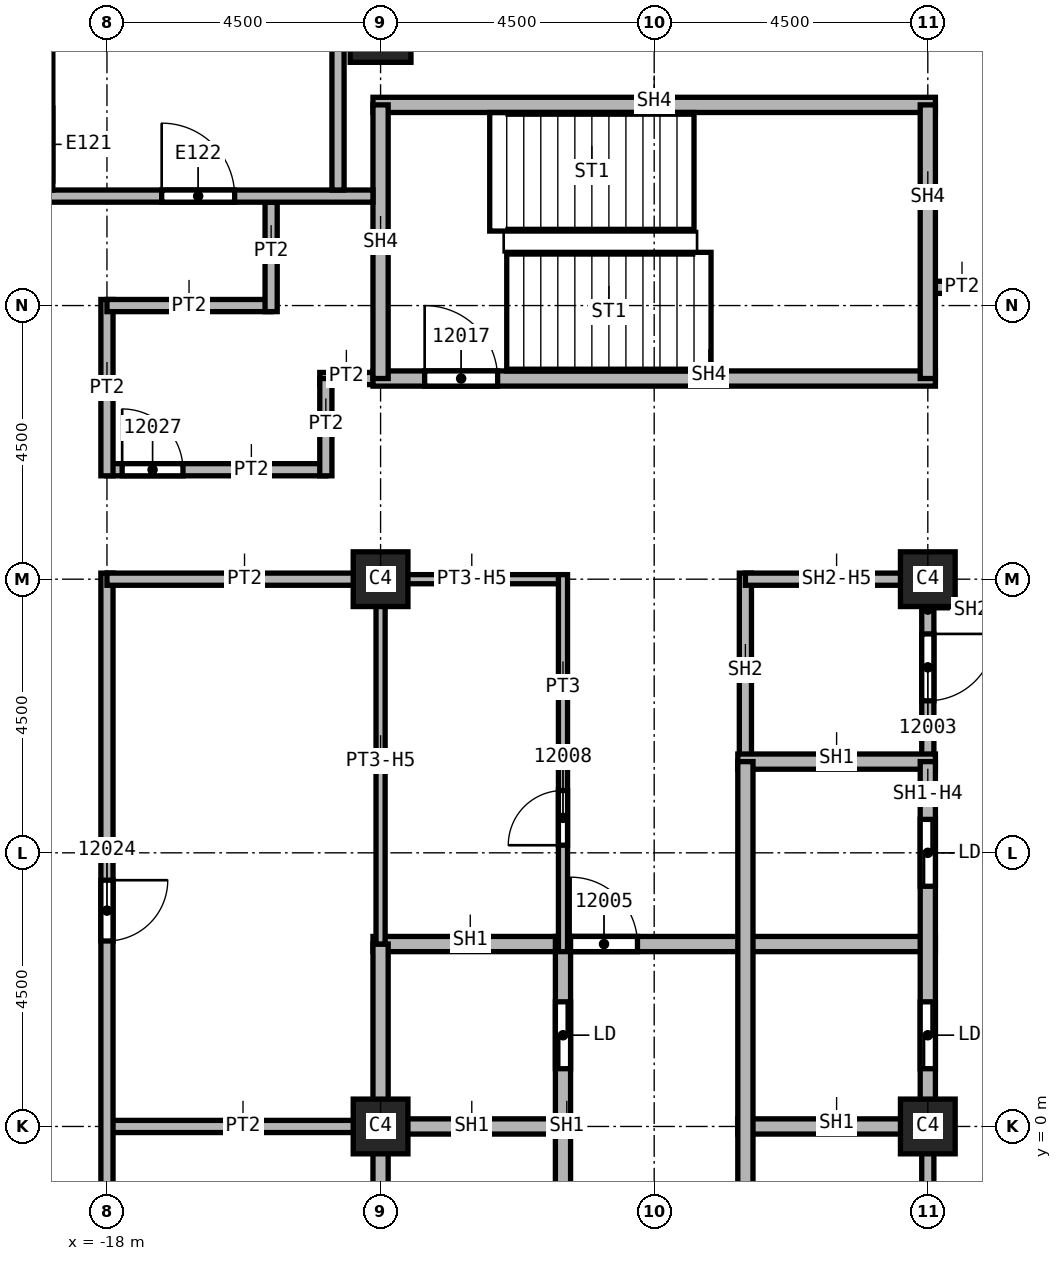
"""IFC4 building model, lengths in metres.
Left out: names, types, materials, properties, quantities, classifications, styles, units other than length and angle.
Written with IfcOpenShell. Run it as: python <this file> out.ifc"""

import sys

from ifc_helpers import new_model, si_unit, direction, frame, frame_2d, origin, origin_2d, place, context, subcontext, project, spatial, rectangle, extrude, element, fill, save


model = new_model("IFC4")
c1 = context("Model", 3, precision=1e-05, world=origin(), true_north=direction((0.0, 1.0)))
c2 = subcontext(c1, "Body", "Model", "MODEL_VIEW")
j1 = project(units=[si_unit("LENGTHUNIT", "METRE"), si_unit("PLANEANGLEUNIT", "RADIAN")], contexts=[c1])
p1 = place(None, origin())
s1 = spatial("IfcSite", under=j1, at=p1, CompositionType="ELEMENT")
p2 = place(p1, origin())
s2 = spatial("IfcBuilding", under=s1, at=p2, CompositionType="ELEMENT")
p3 = place(p2, frame((0.0, 0.0, 196.0)))
s3 = spatial("IfcBuildingStorey", under=s2, at=p3, CompositionType="ELEMENT", Elevation=196.0)
p4 = place(p3, frame((-13.5, 18.0, 0.0), z_axis=(0.0, 0.0, 1.0), x_axis=(1.0, 0.0, 0.0)))
e1 = element("IfcColumn", 1, at=p4, inside=s3, PredefinedType="COLUMN", context=c2, shape_type="SweptSolid", body=[
    extrude(rectangle(XDim=1.0, YDim=1.0, at=origin_2d()), origin(), (0.0, 0.0, 1.0), 3.72),
])
for number, where, z_axis, x_axis in (
    (2, (-4.5, 0.0, 0.0), (0.0, 0.0, 1.0), (1.0, 0.0, 0.0)),
    (3, (-4.5, 9.0, 0.0), (0.0, 0.0, 1.0), (1.0, 0.0, 0.0)),
    (4, (-13.5, 0.0, 0.0), (0.0, 0.0, 1.0), (1.0, 0.0, 0.0)),
    (5, (-13.5, 9.0, 0.0), (0.0, 0.0, 1.0), (1.0, 0.0, 0.0)),
):
    element("IfcColumn", number, at=place(p3, frame(where, z_axis=z_axis, x_axis=x_axis)), inside=s3, PredefinedType="COLUMN", context=c2, shape_type="SweptSolid", body=[
        extrude(rectangle(XDim=0.9, YDim=0.9, at=origin_2d()), origin(), (0.0, 0.0, 1.0), 3.72),
    ])
p5 = place(p3, frame((-18.0, 0.0, 0.0), z_axis=(0.0, 0.0, 1.0), x_axis=(1.0, 0.0, 0.0)))
e6 = element("IfcWall", 6, at=p5, inside=s3, PredefinedType="PARTITIONING", context=c2, shape_type="SweptSolid", body=[
    extrude(rectangle(XDim=4.5, YDim=0.2, at=frame_2d((2.25, 0.0))), origin(), (0.0, 0.0, 1.0), 3.72),
])
p6 = place(p3, frame((-18.0, 9.1, 0.0), z_axis=(0.0, 0.0, 1.0), x_axis=(0.0, -1.0, 0.0)))
e7 = element("IfcWall", 7, at=p6, inside=s3, PredefinedType="PARTITIONING", context=c2, shape_type="SweptSolid", body=[
    extrude(rectangle(XDim=18.2, YDim=0.2, at=frame_2d((9.1, 0.0))), origin(), (0.0, 0.0, 1.0), 3.72),
])
p7 = place(p6, frame((14.95, 0.0, 0.0)))
e8 = element("IfcOpeningElement", 8, at=p7, cuts=e7, PredefinedType="OPENING", context=c2, shape_type="SweptSolid", body=[
    extrude(rectangle(XDim=1.0, YDim=2.1, at=frame_2d((0.5, 1.05))), frame((0.0, 0.1, 0.0), z_axis=(0.0, -1.0, 0.0), x_axis=(1.0, 0.0, 0.0)), (0.0, 0.0, 1.0), 0.2),
])
p8 = place(p6, frame((5.05, 0.0, 0.0)))
e9 = element("IfcOpeningElement", 9, at=p8, cuts=e7, PredefinedType="OPENING", context=c2, shape_type="SweptSolid", body=[
    extrude(rectangle(XDim=1.0, YDim=2.1, at=frame_2d((0.5, 1.05))), frame((0.0, 0.1, 0.0), z_axis=(0.0, -1.0, 0.0), x_axis=(1.0, 0.0, 0.0)), (0.0, 0.0, 1.0), 0.2),
])
p9 = place(p3, frame((-18.0, 10.8, 0.0), z_axis=(0.0, 0.0, 1.0), x_axis=(1.0, 0.0, 0.0)))
e10 = element("IfcWall", 10, at=p9, inside=s3, PredefinedType="PARTITIONING", context=c2, shape_type="SweptSolid", body=[
    extrude(rectangle(XDim=3.6, YDim=0.2, at=frame_2d((1.8, 0.0))), origin(), (0.0, 0.0, 1.0), 3.72),
])
p10 = place(p9, frame((0.25, 0.0, 0.0)))
e11 = element("IfcOpeningElement", 11, at=p10, cuts=e10, PredefinedType="OPENING", context=c2, shape_type="SweptSolid", body=[
    extrude(rectangle(XDim=1.0, YDim=2.1, at=frame_2d((0.5, 1.05))), frame((0.0, 0.1, 0.0), z_axis=(0.0, -1.0, 0.0), x_axis=(1.0, 0.0, 0.0)), (0.0, 0.0, 1.0), 0.2),
])
p11 = place(p3, frame((-18.0, 13.6, 0.0), z_axis=(0.0, 0.0, 1.0), x_axis=(0.0, -1.0, 0.0)))
e12 = element("IfcWall", 12, at=p11, inside=s3, PredefinedType="PARTITIONING", context=c2, shape_type="SweptSolid", body=[
    extrude(rectangle(XDim=2.9, YDim=0.2, at=frame_2d((1.45, 0.0))), origin(), (0.0, 0.0, 1.0), 3.72),
])
p12 = place(p3, frame((-15.3, 13.5, 0.0), z_axis=(0.0, 0.0, 1.0), x_axis=(-1.0, 0.0, 0.0)))
e13 = element("IfcWall", 13, at=p12, inside=s3, PredefinedType="PARTITIONING", context=c2, shape_type="SweptSolid", body=[
    extrude(rectangle(XDim=2.7, YDim=0.2, at=frame_2d((1.35, 0.0))), origin(), (0.0, 0.0, 1.0), 3.72),
])
p13 = place(p3, frame((-15.3, 15.2, 0.0), z_axis=(0.0, 0.0, 1.0), x_axis=(0.0, -1.0, 0.0)))
e14 = element("IfcWall", 14, at=p13, inside=s3, PredefinedType="PARTITIONING", context=c2, shape_type="SweptSolid", body=[
    extrude(rectangle(XDim=1.8, YDim=0.2, at=frame_2d((0.9, 0.0))), origin(), (0.0, 0.0, 1.0), 3.72),
])
p14 = place(p3, frame((-14.5, 12.3, 0.0), z_axis=(0.0, 0.0, 1.0), x_axis=(1.0, 0.0, 0.0)))
e15 = element("IfcWall", 15, at=p14, inside=s3, PredefinedType="PARTITIONING", context=c2, shape_type="SweptSolid", body=[
    extrude(rectangle(XDim=1.125, YDim=0.2, at=frame_2d((0.562, 0.0))), origin(), (0.0, 0.0, 1.0), 3.72),
])
p15 = place(p3, frame((-13.5, 9.0, 0.0), z_axis=(0.0, 0.0, 1.0), x_axis=(-1.0, 0.0, 0.0)))
e16 = element("IfcWall", 16, at=p15, inside=s3, PredefinedType="PARTITIONING", context=c2, shape_type="SweptSolid", body=[
    extrude(rectangle(XDim=4.5, YDim=0.2, at=frame_2d((2.25, 0.0))), origin(), (0.0, 0.0, 1.0), 3.72),
])
p16 = place(p3, frame((-14.4, 10.7, 0.0), z_axis=(0.0, 0.0, 1.0), x_axis=(0.0, 1.0, 0.0)))
e17 = element("IfcWall", 17, at=p16, inside=s3, PredefinedType="PARTITIONING", context=c2, shape_type="SweptSolid", body=[
    extrude(rectangle(XDim=1.6, YDim=0.2, at=frame_2d((0.8, 0.0))), origin(), (0.0, 0.0, 1.0), 3.72),
])
p17 = place(p3, frame((-4.5, 13.8, 0.0), z_axis=(0.0, 0.0, 1.0), x_axis=(1.0, 0.0, 0.0)))
e18 = element("IfcWall", 18, at=p17, inside=s3, PredefinedType="PARTITIONING", context=c2, shape_type="SweptSolid", body=[
    extrude(rectangle(XDim=1.0, YDim=0.2, at=frame_2d((0.5, 0.0))), origin(), (0.0, 0.0, 1.0), 3.72),
])
p18 = place(p3, frame((-7.5, 6.0, 0.0), z_axis=(0.0, 0.0, 1.0), x_axis=(0.0, 1.0, 0.0)))
e19 = element("IfcWall", 19, at=p18, inside=s3, PredefinedType="SOLIDWALL", context=c2, shape_type="SweptSolid", body=[
    extrude(rectangle(XDim=3.1, YDim=0.2, at=frame_2d((1.55, 0.0))), origin(), (0.0, 0.0, 1.0), 3.72),
])
p19 = place(p3, frame((-7.5, 9.0, 0.0), z_axis=(0.0, 0.0, 1.0), x_axis=(1.0, 0.0, 0.0)))
e20 = element("IfcWall", 20, at=p19, inside=s3, PredefinedType="SOLIDWALL", context=c2, shape_type="SweptSolid", body=[
    extrude(rectangle(XDim=3.0, YDim=0.2, at=frame_2d((1.5, 0.0))), origin(), (0.0, 0.0, 1.0), 2.958),
])
p20 = place(p3, frame((-4.5, 0.0, 0.0), z_axis=(0.0, 0.0, 1.0), x_axis=(0.0, -1.0, 0.0)))
e21 = element("IfcWall", 21, at=p20, inside=s3, PredefinedType="SOLIDWALL", context=c2, shape_type="SweptSolid", body=[
    extrude(rectangle(XDim=9.1, YDim=0.2, at=frame_2d((4.55, 0.0))), origin(), (0.0, 0.0, 1.0), 2.958),
])
p21 = place(p20, frame((6.25, 0.0, 0.0)))
e22 = element("IfcOpeningElement", 22, at=p21, cuts=e21, PredefinedType="OPENING", context=c2, shape_type="SweptSolid", body=[
    extrude(rectangle(XDim=1.1, YDim=2.1, at=frame_2d((0.55, 1.05))), frame((0.0, 0.1, 0.0), z_axis=(0.0, -1.0, 0.0), x_axis=(1.0, 0.0, 0.0)), (0.0, 0.0, 1.0), 0.2),
])
p22 = place(p20, frame((4.6, 0.0, 0.0)))
e23 = element("IfcOpeningElement", 23, at=p22, cuts=e21, PredefinedType="OPENING", context=c2, shape_type="SweptSolid", body=[
    extrude(rectangle(XDim=1.1, YDim=2.1, at=frame_2d((0.55, 1.05))), frame((0.0, 0.1, 0.0), z_axis=(0.0, -1.0, 0.0), x_axis=(1.0, 0.0, 0.0)), (0.0, 0.0, 1.0), 0.2),
])
p23 = place(p3, frame((-4.5, 9.1, 0.0), z_axis=(0.0, 0.0, 1.0), x_axis=(0.0, -1.0, 0.0)))
e24 = element("IfcWall", 24, at=p23, inside=s3, PredefinedType="SOLIDWALL", context=c2, shape_type="SweptSolid", body=[
    extrude(rectangle(XDim=3.1, YDim=0.2, at=frame_2d((1.55, 0.0))), origin(), (0.0, 0.0, 1.0), 2.958),
])
p24 = place(p23, frame((1.0, 0.0, 0.0)))
e25 = element("IfcOpeningElement", 25, at=p24, cuts=e24, PredefinedType="OPENING", context=c2, shape_type="SweptSolid", body=[
    extrude(rectangle(XDim=1.1, YDim=2.1, at=frame_2d((0.55, 1.05))), frame((0.0, 0.1, 0.0), z_axis=(0.0, -1.0, 0.0), x_axis=(1.0, 0.0, 0.0)), (0.0, 0.0, 1.0), 0.2),
])
p25 = place(p3, frame((-13.625, 0.0, 0.0), z_axis=(0.0, 0.0, 1.0), x_axis=(1.0, 0.0, 0.0)))
e26 = element("IfcWall", 26, at=p25, inside=s3, PredefinedType="SOLIDWALL", context=c2, shape_type="SweptSolid", body=[
    extrude(rectangle(XDim=3.125, YDim=0.25, at=frame_2d((1.562, 0.0))), origin(), (0.0, 0.0, 1.0), 3.72),
])
p26 = place(p3, frame((-13.625, 3.0, 0.0), z_axis=(0.0, 0.0, 1.0), x_axis=(1.0, 0.0, 0.0)))
e27 = element("IfcWall", 27, at=p26, inside=s3, PredefinedType="SOLIDWALL", context=c2, shape_type="SweptSolid", body=[
    extrude(rectangle(XDim=9.25, YDim=0.25, at=frame_2d((4.625, 0.0))), origin(), (0.0, 0.0, 1.0), 3.72),
])
p27 = place(p26, frame((3.25, 0.0, 0.0)))
e28 = element("IfcOpeningElement", 28, at=p27, cuts=e27, PredefinedType="OPENING", context=c2, shape_type="SweptSolid", body=[
    extrude(rectangle(XDim=1.1, YDim=2.1, at=frame_2d((0.55, 1.05))), frame((0.0, 0.125, 0.0), z_axis=(0.0, -1.0, 0.0), x_axis=(1.0, 0.0, 0.0)), (0.0, 0.0, 1.0), 0.25),
])
p28 = place(p3, frame((-13.5, -3.0, 0.0), z_axis=(0.0, 0.0, 1.0), x_axis=(0.0, 1.0, 0.0)))
e29 = element("IfcWall", 29, at=p28, inside=s3, PredefinedType="SOLIDWALL", context=c2, shape_type="SweptSolid", body=[
    extrude(rectangle(XDim=6.0, YDim=0.25, at=frame_2d((3.0, 0.0))), origin(), (0.0, 0.0, 1.0), 2.958),
])
p29 = place(p3, frame((-10.5, -3.125, 0.0), z_axis=(0.0, 0.0, 1.0), x_axis=(0.0, 1.0, 0.0)))
e30 = element("IfcWall", 30, at=p29, inside=s3, PredefinedType="SOLIDWALL", context=c2, shape_type="SweptSolid", body=[
    extrude(rectangle(XDim=6.25, YDim=0.25, at=frame_2d((3.125, 0.0))), origin(), (0.0, 0.0, 1.0), 3.72),
])
p30 = place(p29, frame((1.075, 0.0, 0.0)))
e31 = element("IfcOpeningElement", 31, at=p30, cuts=e30, PredefinedType="OPENING", context=c2, shape_type="SweptSolid", body=[
    extrude(rectangle(XDim=1.1, YDim=2.1, at=frame_2d((0.55, 1.05))), frame((0.0, 0.125, 0.0), z_axis=(0.0, -1.0, 0.0), x_axis=(1.0, 0.0, 0.0)), (0.0, 0.0, 1.0), 0.25),
])
p31 = place(p29, frame((4.075, 0.0, 0.0)))
e32 = element("IfcOpeningElement", 32, at=p31, cuts=e30, PredefinedType="OPENING", context=c2, shape_type="SweptSolid", body=[
    extrude(rectangle(XDim=1.1, YDim=2.1, at=frame_2d((0.55, 1.05))), frame((0.0, 0.125, 0.0), z_axis=(0.0, -1.0, 0.0), x_axis=(1.0, 0.0, 0.0)), (0.0, 0.0, 1.0), 0.25),
])
for number, where, z_axis, x_axis in (
    (33, (-7.625, 0.0, 0.0), (0.0, 0.0, 1.0), (1.0, 0.0, 0.0)),
    (34, (-7.625, 6.0, 0.0), (0.0, 0.0, 1.0), (1.0, 0.0, 0.0)),
):
    element("IfcWall", number, at=place(p3, frame(where, z_axis=z_axis, x_axis=x_axis)), inside=s3, PredefinedType="SOLIDWALL", context=c2, shape_type="SweptSolid", body=[
        extrude(rectangle(XDim=3.25, YDim=0.25, at=frame_2d((1.625, 0.0))), origin(), (0.0, 0.0, 1.0), 3.72),
    ])
p32 = place(p3, frame((-7.5, -3.125, 0.0), z_axis=(0.0, 0.0, 1.0), x_axis=(0.0, 1.0, 0.0)))
e35 = element("IfcWall", 35, at=p32, inside=s3, PredefinedType="SOLIDWALL", context=c2, shape_type="SweptSolid", body=[
    extrude(rectangle(XDim=9.125, YDim=0.25, at=frame_2d((4.562, 0.0))), origin(), (0.0, 0.0, 1.0), 3.72),
])
p33 = place(p3, frame((-4.5, 6.0, 0.0), z_axis=(0.0, 0.0, 1.0), x_axis=(0.0, -1.0, 0.0)))
e36 = element("IfcWall", 36, at=p33, inside=s3, PredefinedType="SOLIDWALL", context=c2, shape_type="SweptSolid", body=[
    extrude(rectangle(XDim=6.0, YDim=0.25, at=frame_2d((3.0, 0.0))), origin(), (0.0, 0.0, 1.0), 2.958),
])
p34 = place(p33, frame((3.95, 0.0, 0.0)))
e37 = element("IfcOpeningElement", 37, at=p34, cuts=e36, PredefinedType="OPENING", context=c2, shape_type="SweptSolid", body=[
    extrude(rectangle(XDim=1.1, YDim=2.1, at=frame_2d((0.55, 1.05))), frame((0.0, 0.125, 0.0), z_axis=(0.0, -1.0, 0.0), x_axis=(1.0, 0.0, 0.0)), (0.0, 0.0, 1.0), 0.25),
])
p35 = place(p33, frame((0.95, 0.0, 0.0)))
e38 = element("IfcOpeningElement", 38, at=p35, cuts=e36, PredefinedType="OPENING", context=c2, shape_type="SweptSolid", body=[
    extrude(rectangle(XDim=1.1, YDim=2.1, at=frame_2d((0.55, 1.05))), frame((0.0, 0.125, 0.0), z_axis=(0.0, -1.0, 0.0), x_axis=(1.0, 0.0, 0.0)), (0.0, 0.0, 1.0), 0.25),
])
p36 = place(p3, frame((-13.625, 12.3, 0.0), z_axis=(0.0, 0.0, 1.0), x_axis=(1.0, 0.0, 0.0)))
e39 = element("IfcWall", 39, at=p36, inside=s3, PredefinedType="SOLIDWALL", context=c2, shape_type="SweptSolid", body=[
    extrude(rectangle(XDim=9.25, YDim=0.25, at=frame_2d((4.625, 0.0))), origin(), (0.0, 0.0, 1.0), 3.72),
])
p37 = place(p36, frame((0.85, 0.0, 0.0)))
e40 = element("IfcOpeningElement", 40, at=p37, cuts=e39, PredefinedType="OPENING", context=c2, shape_type="SweptSolid", body=[
    extrude(rectangle(XDim=1.2, YDim=2.1, at=frame_2d((0.6, 1.05))), frame((0.0, 0.125, 0.0), z_axis=(0.0, -1.0, 0.0), x_axis=(1.0, 0.0, 0.0)), (0.0, 0.0, 1.0), 0.25),
])
p38 = place(p3, frame((-13.625, 16.8, 0.0), z_axis=(0.0, 0.0, 1.0), x_axis=(1.0, 0.0, 0.0)))
e41 = element("IfcWall", 41, at=p38, inside=s3, PredefinedType="SOLIDWALL", context=c2, shape_type="SweptSolid", body=[
    extrude(rectangle(XDim=9.25, YDim=0.25, at=frame_2d((4.625, 0.0))), origin(), (0.0, 0.0, 1.0), 3.72),
])
for number, where, z_axis, x_axis in (
    (42, (-13.5, 12.3, 0.0), (0.0, 0.0, 1.0), (0.0, 1.0, 0.0)),
    (43, (-4.5, 16.8, 0.0), (0.0, 0.0, 1.0), (0.0, -1.0, 0.0)),
):
    element("IfcWall", number, at=place(p3, frame(where, z_axis=z_axis, x_axis=x_axis)), inside=s3, PredefinedType="SOLIDWALL", context=c2, shape_type="SweptSolid", body=[
        extrude(rectangle(XDim=4.5, YDim=0.25, at=frame_2d((2.25, 0.0))), origin(), (0.0, 0.0, 1.0), 3.72),
    ])
p39 = place(p3, frame((-13.575, 9.0, 0.0), z_axis=(0.0, 0.0, 1.0), x_axis=(1.0, 0.0, 0.0)))
e44 = element("IfcWall", 44, at=p39, inside=s3, PredefinedType="PARTITIONING", context=c2, shape_type="SweptSolid", body=[
    extrude(rectangle(XDim=3.075, YDim=0.15, at=frame_2d((1.538, 0.0))), origin(), (0.0, 0.0, 1.0), 2.958),
])
p40 = place(p3, frame((-13.5, 3.0, 0.0), z_axis=(0.0, 0.0, 1.0), x_axis=(0.0, 1.0, 0.0)))
e45 = element("IfcWall", 45, at=p40, inside=s3, PredefinedType="PARTITIONING", context=c2, shape_type="SweptSolid", body=[
    extrude(rectangle(XDim=6.1, YDim=0.15, at=frame_2d((3.05, 0.0))), origin(), (0.0, 0.0, 1.0), 2.958),
])
p41 = place(p3, frame((-10.5, 2.875, 0.0), z_axis=(0.0, 0.0, 1.0), x_axis=(0.0, 1.0, 0.0)))
e46 = element("IfcWall", 46, at=p41, inside=s3, PredefinedType="PARTITIONING", context=c2, shape_type="SweptSolid", body=[
    extrude(rectangle(XDim=6.2, YDim=0.15, at=frame_2d((3.1, 0.0))), origin(), (0.0, 0.0, 1.0), 3.72),
])
p42 = place(p41, frame((1.75, 0.0, 0.0)))
e47 = element("IfcOpeningElement", 47, at=p42, cuts=e46, PredefinedType="OPENING", context=c2, shape_type="SweptSolid", body=[
    extrude(rectangle(XDim=0.9, YDim=2.1, at=frame_2d((0.45, 1.05))), frame((0.0, 0.075, 0.0), z_axis=(0.0, -1.0, 0.0), x_axis=(1.0, 0.0, 0.0)), (0.0, 0.0, 1.0), 0.15),
])
p43 = place(p3, frame((-21.9, 15.3, 0.0), z_axis=(0.0, 0.0, 1.0), x_axis=(1.0, 0.0, 0.0)))
e48 = element("IfcWall", 48, at=p43, inside=s3, PredefinedType="SOLIDWALL", context=c2, shape_type="SweptSolid", body=[
    extrude(rectangle(XDim=8.275, YDim=0.2, at=frame_2d((4.137, 0.0))), origin(), (0.0, 0.0, 1.0), 3.72),
])
p44 = place(p43, frame((4.8, 0.0, 0.0)))
e49 = element("IfcOpeningElement", 49, at=p44, cuts=e48, PredefinedType="OPENING", context=c2, shape_type="SweptSolid", body=[
    extrude(rectangle(XDim=1.2, YDim=2.1, at=frame_2d((0.6, 1.05))), frame((0.0, 0.1, 0.0), z_axis=(0.0, -1.0, 0.0), x_axis=(1.0, 0.0, 0.0)), (0.0, 0.0, 1.0), 0.2),
])
p45 = place(p3, frame((-14.2, 15.4, 0.0), z_axis=(0.0, 0.0, 1.0), x_axis=(0.0, 1.0, 0.0)))
e50 = element("IfcWall", 50, at=p45, inside=s3, PredefinedType="SOLIDWALL", context=c2, shape_type="SweptSolid", body=[
    extrude(rectangle(XDim=5.9, YDim=0.2, at=frame_2d((2.95, 0.0))), origin(), (0.0, 0.0, 1.0), 3.72),
])
p46 = place(p3, frame((-18.99, 15.4, 0.0), z_axis=(0.0, 0.0, 1.0), x_axis=(0.0, 1.0, 0.0)))
e51 = element("IfcWall", 51, at=p46, inside=s3, PredefinedType="SOLIDWALL", context=c2, shape_type="SweptSolid", body=[
    extrude(rectangle(XDim=5.9, YDim=0.2, at=frame_2d((2.95, 0.0))), origin(), (0.0, 0.0, 1.0), 3.72),
])
p47 = place(p46, frame((0.15, 0.0, 0.0)))
e52 = element("IfcOpeningElement", 52, at=p47, cuts=e51, PredefinedType="OPENING", context=c2, shape_type="SweptSolid", body=[
    extrude(rectangle(XDim=1.2, YDim=2.1, at=frame_2d((0.6, 1.05))), frame((0.0, 0.1, 0.0), z_axis=(0.0, -1.0, 0.0), x_axis=(1.0, 0.0, 0.0)), (0.0, 0.0, 1.0), 0.2),
])
p48 = place(p24, origin())
e53 = element("IfcDoor", 53, at=p48, inside=s3, OperationType="SINGLE_SWING_RIGHT", PredefinedType="DOOR", context=c2, shape_type="SweptSolid", body=[
    extrude(rectangle(XDim=1.1, YDim=2.1, at=frame_2d((0.55, 1.05))), frame((0.0, 0.025, 0.0), z_axis=(0.0, -1.0, 0.0), x_axis=(1.0, 0.0, 0.0)), (0.0, 0.0, 1.0), 0.05),
])
fill(e25, e53)
p49 = place(p27, origin())
e54 = element("IfcDoor", 54, at=p49, inside=s3, OperationType="SINGLE_SWING_RIGHT", PredefinedType="DOOR", context=c2, shape_type="SweptSolid", body=[
    extrude(rectangle(XDim=1.1, YDim=2.1, at=frame_2d((0.55, 1.05))), frame((0.0, 0.025, 0.0), z_axis=(0.0, -1.0, 0.0), x_axis=(1.0, 0.0, 0.0)), (0.0, 0.0, 1.0), 0.05),
])
fill(e28, e54)
p50 = place(p42, origin())
e55 = element("IfcDoor", 55, at=p50, inside=s3, OperationType="SINGLE_SWING_LEFT", PredefinedType="DOOR", context=c2, shape_type="SweptSolid", body=[
    extrude(rectangle(XDim=0.9, YDim=2.1, at=frame_2d((0.45, 1.05))), frame((0.0, 0.025, 0.0), z_axis=(0.0, -1.0, 0.0), x_axis=(1.0, 0.0, 0.0)), (0.0, 0.0, 1.0), 0.05),
])
fill(e47, e55)
p51 = place(p37, origin())
e56 = element("IfcDoor", 56, at=p51, inside=s3, OperationType="SINGLE_SWING_RIGHT", PredefinedType="DOOR", context=c2, shape_type="SweptSolid", body=[
    extrude(rectangle(XDim=1.2, YDim=2.1, at=frame_2d((0.6, 1.05))), frame((0.0, 0.025, 0.0), z_axis=(0.0, -1.0, 0.0), x_axis=(1.0, 0.0, 0.0)), (0.0, 0.0, 1.0), 0.05),
])
fill(e40, e56)
p52 = place(p8, origin())
e57 = element("IfcDoor", 57, at=p52, inside=s3, OperationType="SINGLE_SWING_LEFT", PredefinedType="DOOR", context=c2, shape_type="SweptSolid", body=[
    extrude(rectangle(XDim=1.0, YDim=2.1, at=frame_2d((0.5, 1.05))), frame((0.0, 0.025, 0.0), z_axis=(0.0, -1.0, 0.0), x_axis=(1.0, 0.0, 0.0)), (0.0, 0.0, 1.0), 0.05),
])
fill(e9, e57)
p53 = place(p10, origin())
e58 = element("IfcDoor", 58, at=p53, inside=s3, OperationType="SINGLE_SWING_RIGHT", PredefinedType="DOOR", context=c2, shape_type="SweptSolid", body=[
    extrude(rectangle(XDim=1.0, YDim=2.1, at=frame_2d((0.5, 1.05))), frame((0.0, 0.025, 0.0), z_axis=(0.0, -1.0, 0.0), x_axis=(1.0, 0.0, 0.0)), (0.0, 0.0, 1.0), 0.05),
])
fill(e11, e58)
p54 = place(p34, origin())
e59 = element("IfcDoor", 59, at=p54, inside=s3, OperationType="SLIDING_TO_LEFT", PredefinedType="DOOR", context=c2, shape_type="SweptSolid", body=[
    extrude(rectangle(XDim=1.1, YDim=2.1, at=frame_2d((0.55, 1.05))), frame((0.0, 0.025, 0.0), z_axis=(0.0, -1.0, 0.0), x_axis=(1.0, 0.0, 0.0)), (0.0, 0.0, 1.0), 0.05),
])
fill(e37, e59)
p55 = place(p35, origin())
e60 = element("IfcDoor", 60, at=p55, inside=s3, OperationType="SLIDING_TO_LEFT", PredefinedType="DOOR", context=c2, shape_type="SweptSolid", body=[
    extrude(rectangle(XDim=1.1, YDim=2.1, at=frame_2d((0.55, 1.05))), frame((0.0, 0.025, 0.0), z_axis=(0.0, -1.0, 0.0), x_axis=(1.0, 0.0, 0.0)), (0.0, 0.0, 1.0), 0.05),
])
fill(e38, e60)
p56 = place(p31, origin())
e61 = element("IfcDoor", 61, at=p56, inside=s3, OperationType="SLIDING_TO_LEFT", PredefinedType="DOOR", context=c2, shape_type="SweptSolid", body=[
    extrude(rectangle(XDim=1.1, YDim=2.1, at=frame_2d((0.55, 1.05))), frame((0.0, 0.025, 0.0), z_axis=(0.0, -1.0, 0.0), x_axis=(1.0, 0.0, 0.0)), (0.0, 0.0, 1.0), 0.05),
])
fill(e32, e61)
p57 = place(p44, origin())
e62 = element("IfcDoor", 62, at=p57, inside=s3, OperationType="SINGLE_SWING_RIGHT", PredefinedType="DOOR", context=c2, shape_type="SweptSolid", body=[
    extrude(rectangle(XDim=1.2, YDim=2.1, at=frame_2d((0.6, 1.05))), frame((0.0, 0.025, 0.0), z_axis=(0.0, -1.0, 0.0), x_axis=(1.0, 0.0, 0.0)), (0.0, 0.0, 1.0), 0.05),
])
fill(e49, e62)
save(model, sys.argv[1])
